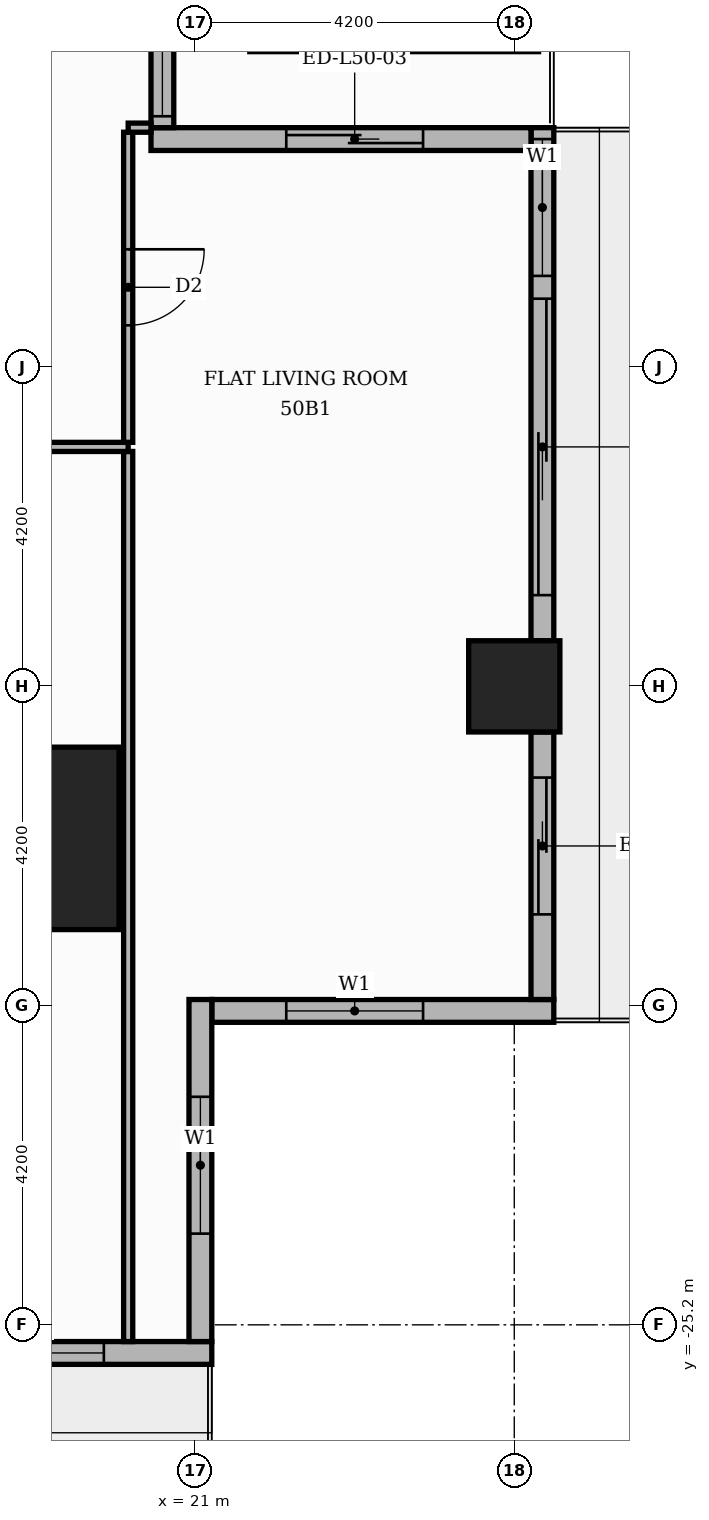
"""IFC4 building model, lengths in metres.
Left out: names, types, materials, properties, quantities, classifications, styles, units other than length and angle.
Written with IfcOpenShell. Run it as: python <this file> out.ifc"""

import sys

from ifc_helpers import new_model, si_unit, direction, frame, frame_2d, origin, origin_2d, place, context, subcontext, project, spatial, rectangle, extrude, element, fill, save


model = new_model("IFC4")
c1 = context("Model", 3, precision=1e-05, world=origin(), true_north=direction((0.0, 1.0)))
c2 = subcontext(c1, "Body", "Model", "MODEL_VIEW")
j1 = project(units=[si_unit("LENGTHUNIT", "METRE"), si_unit("PLANEANGLEUNIT", "RADIAN")], contexts=[c1])
p1 = place(None, origin())
s1 = spatial("IfcSite", under=j1, at=p1, CompositionType="ELEMENT")
p2 = place(p1, origin())
s2 = spatial("IfcBuilding", under=s1, at=p2, CompositionType="ELEMENT")
p3 = place(p2, frame((0.0, 0.0, 211.8)))
s3 = spatial("IfcBuildingStorey", under=s2, at=p3, CompositionType="ELEMENT", Elevation=211.8)
p4 = place(p3, frame((18.8, -18.8, 0.0), z_axis=(0.0, 0.0, 1.0), x_axis=(1.0, 0.0, 0.0)))
e1 = element("IfcColumn", 1, at=p4, inside=s3, PredefinedType="COLUMN", context=c2, shape_type="SweptSolid", body=[
    extrude(rectangle(XDim=2.4, YDim=2.4, at=origin_2d()), origin(), (0.0, 0.0, 1.0), 3.9),
])
p5 = place(p3, frame((25.2, -16.8, 0.0), z_axis=(0.0, 0.0, 1.0), x_axis=(1.0, 0.0, 0.0)))
e2 = element("IfcColumn", 2, at=p5, inside=s3, PredefinedType="COLUMN", context=c2, shape_type="SweptSolid", body=[
    extrude(rectangle(XDim=1.2, YDim=1.2, at=origin_2d()), origin(), (0.0, 0.0, 1.0), 3.9),
])
p6 = place(p3, frame((21.22, -21.07, 0.0), z_axis=(0.0, 0.0, 1.0), x_axis=(1.0, 0.0, 0.0)))
e3 = element("IfcWall", 3, at=p6, inside=s3, PredefinedType="STANDARD", context=c2, shape_type="SweptSolid", body=[
    extrude(rectangle(XDim=4.5, YDim=0.3, at=frame_2d((2.25, 0.0))), origin(), (0.0, 0.0, 1.0), 3.48),
])
p7 = place(p6, frame((0.98, 0.0, 0.9)))
e4 = element("IfcOpeningElement", 4, at=p7, cuts=e3, PredefinedType="OPENING", context=c2, shape_type="SweptSolid", body=[
    extrude(rectangle(XDim=1.8, YDim=2.1, at=frame_2d((0.9, 1.05))), frame((0.0, 0.16, 0.0), z_axis=(0.0, -1.0, 0.0), x_axis=(1.0, 0.0, 0.0)), (0.0, 0.0, 1.0), 0.32),
])
p8 = place(p3, frame((25.57, -20.92, 0.0), z_axis=(0.0, 0.0, 1.0), x_axis=(0.0, 1.0, 0.0)))
e5 = element("IfcWall", 5, at=p8, inside=s3, PredefinedType="STANDARD", context=c2, shape_type="SweptSolid", body=[
    extrude(rectangle(XDim=3.52, YDim=0.3, at=frame_2d((1.76, 0.0))), origin(), (0.0, 0.0, 1.0), 3.48),
])
p9 = place(p8, frame((1.12, 0.0, 0.0)))
e6 = element("IfcOpeningElement", 6, at=p9, cuts=e5, PredefinedType="OPENING", context=c2, shape_type="SweptSolid", body=[
    extrude(rectangle(XDim=1.8, YDim=2.4, at=frame_2d((0.9, 1.2))), frame((0.0, 0.16, 0.0), z_axis=(0.0, -1.0, 0.0), x_axis=(1.0, 0.0, 0.0)), (0.0, 0.0, 1.0), 0.32),
])
p10 = place(p3, frame((25.57, -16.2, 0.0), z_axis=(0.0, 0.0, 1.0), x_axis=(0.0, 1.0, 0.0)))
e7 = element("IfcWall", 7, at=p10, inside=s3, PredefinedType="STANDARD", context=c2, shape_type="SweptSolid", body=[
    extrude(rectangle(XDim=6.75, YDim=0.3, at=frame_2d((3.375, 0.0))), origin(), (0.0, 0.0, 1.0), 3.48),
])
p11 = place(p10, frame((0.6, 0.0, 0.0)))
e8 = element("IfcOpeningElement", 8, at=p11, cuts=e7, PredefinedType="OPENING", context=c2, shape_type="SweptSolid", body=[
    extrude(rectangle(XDim=3.9, YDim=2.4, at=frame_2d((1.95, 1.2))), frame((0.0, 0.16, 0.0), z_axis=(0.0, -1.0, 0.0), x_axis=(1.0, 0.0, 0.0)), (0.0, 0.0, 1.0), 0.32),
])
p12 = place(p10, frame((4.8, 0.0, 0.9)))
e9 = element("IfcOpeningElement", 9, at=p12, cuts=e7, PredefinedType="OPENING", context=c2, shape_type="SweptSolid", body=[
    extrude(rectangle(XDim=1.8, YDim=2.1, at=frame_2d((0.9, 1.05))), frame((0.0, 0.16, 0.0), z_axis=(0.0, -1.0, 0.0), x_axis=(1.0, 0.0, 0.0)), (0.0, 0.0, 1.0), 0.32),
])
p13 = place(p3, frame((25.42, -9.6, 0.0), z_axis=(0.0, 0.0, 1.0), x_axis=(-1.0, 0.0, 0.0)))
e10 = element("IfcWall", 10, at=p13, inside=s3, PredefinedType="STANDARD", context=c2, shape_type="SweptSolid", body=[
    extrude(rectangle(XDim=5.0, YDim=0.3, at=frame_2d((2.5, 0.0))), origin(), (0.0, 0.0, 1.0), 3.48),
])
p14 = place(p13, frame((1.42, 0.0, 0.0)))
e11 = element("IfcOpeningElement", 11, at=p14, cuts=e10, PredefinedType="OPENING", context=c2, shape_type="SweptSolid", body=[
    extrude(rectangle(XDim=1.8, YDim=2.4, at=frame_2d((0.9, 1.2))), frame((0.0, 0.16, 0.0), z_axis=(0.0, -1.0, 0.0), x_axis=(1.0, 0.0, 0.0)), (0.0, 0.0, 1.0), 0.32),
])
p15 = place(p3, frame((20.57, -9.45, 0.0), z_axis=(0.0, 0.0, 1.0), x_axis=(0.0, 1.0, 0.0)))
e12 = element("IfcWall", 12, at=p15, inside=s3, PredefinedType="STANDARD", context=c2, shape_type="SweptSolid", body=[
    extrude(rectangle(XDim=19.2, YDim=0.3, at=frame_2d((9.6, 0.0))), origin(), (0.0, 0.0, 1.0), 3.48),
])
p16 = place(p15, frame((0.15, 0.0, 0.9)))
e13 = element("IfcOpeningElement", 13, at=p16, cuts=e12, PredefinedType="OPENING", context=c2, shape_type="SweptSolid", body=[
    extrude(rectangle(XDim=6.0, YDim=2.1, at=frame_2d((3.0, 1.05))), frame((0.0, 0.16, 0.0), z_axis=(0.0, -1.0, 0.0), x_axis=(1.0, 0.0, 0.0)), (0.0, 0.0, 1.0), 0.32),
])
p17 = place(p15, frame((6.45, 0.0, 0.9)))
e14 = element("IfcOpeningElement", 14, at=p17, cuts=e12, PredefinedType="OPENING", context=c2, shape_type="SweptSolid", body=[
    extrude(rectangle(XDim=6.0, YDim=2.1, at=frame_2d((3.0, 1.05))), frame((0.0, 0.16, 0.0), z_axis=(0.0, -1.0, 0.0), x_axis=(1.0, 0.0, 0.0)), (0.0, 0.0, 1.0), 0.32),
])
p18 = place(p15, frame((12.75, 0.0, 0.9)))
e15 = element("IfcOpeningElement", 15, at=p18, cuts=e12, PredefinedType="OPENING", context=c2, shape_type="SweptSolid", body=[
    extrude(rectangle(XDim=6.0, YDim=2.1, at=frame_2d((3.0, 1.05))), frame((0.0, 0.16, 0.0), z_axis=(0.0, -1.0, 0.0), x_axis=(1.0, 0.0, 0.0)), (0.0, 0.0, 1.0), 0.32),
])
p19 = place(p3, frame((17.4, -25.57, 0.0), z_axis=(0.0, 0.0, 1.0), x_axis=(1.0, 0.0, 0.0)))
e16 = element("IfcWall", 16, at=p19, inside=s3, PredefinedType="STANDARD", context=c2, shape_type="SweptSolid", body=[
    extrude(rectangle(XDim=3.82, YDim=0.3, at=frame_2d((1.91, 0.0))), origin(), (0.0, 0.0, 1.0), 3.48),
])
p20 = place(p19, frame((0.6, 0.0, 0.9)))
e17 = element("IfcOpeningElement", 17, at=p20, cuts=e16, PredefinedType="OPENING", context=c2, shape_type="SweptSolid", body=[
    extrude(rectangle(XDim=1.8, YDim=2.1, at=frame_2d((0.9, 1.05))), frame((0.0, 0.16, 0.0), z_axis=(0.0, -1.0, 0.0), x_axis=(1.0, 0.0, 0.0)), (0.0, 0.0, 1.0), 0.32),
])
p21 = place(p3, frame((21.07, -25.42, 0.0), z_axis=(0.0, 0.0, 1.0), x_axis=(0.0, 1.0, 0.0)))
e18 = element("IfcWall", 18, at=p21, inside=s3, PredefinedType="STANDARD", context=c2, shape_type="SweptSolid", body=[
    extrude(rectangle(XDim=4.5, YDim=0.3, at=frame_2d((2.25, 0.0))), origin(), (0.0, 0.0, 1.0), 3.48),
])
p22 = place(p21, frame((1.42, 0.0, 0.9)))
e19 = element("IfcOpeningElement", 19, at=p22, cuts=e18, PredefinedType="OPENING", context=c2, shape_type="SweptSolid", body=[
    extrude(rectangle(XDim=1.8, YDim=2.1, at=frame_2d((0.9, 1.05))), frame((0.0, 0.16, 0.0), z_axis=(0.0, -1.0, 0.0), x_axis=(1.0, 0.0, 0.0)), (0.0, 0.0, 1.0), 0.32),
])
p23 = place(p3, frame((20.12, -25.42, 0.0), z_axis=(0.0, 0.0, 1.0), x_axis=(0.0, 1.0, 0.0)))
e20 = element("IfcWall", 20, at=p23, inside=s3, PredefinedType="PARTITIONING", context=c2, shape_type="SweptSolid", body=[
    extrude(rectangle(XDim=11.71, YDim=0.12, at=frame_2d((5.855, 0.0))), origin(), (0.0, 0.0, 1.0), 3.48),
])
p24 = place(p3, frame((13.65, -13.65, 0.0), z_axis=(0.0, 0.0, 1.0), x_axis=(1.0, 0.0, 0.0)))
e21 = element("IfcWall", 21, at=p24, inside=s3, PredefinedType="PARTITIONING", context=c2, shape_type="SweptSolid", body=[
    extrude(rectangle(XDim=6.47, YDim=0.12, at=frame_2d((3.235, 0.0))), origin(), (0.0, 0.0, 1.0), 3.48),
])
p25 = place(p24, frame((2.785, 0.0, 0.0)))
e22 = element("IfcOpeningElement", 22, at=p25, cuts=e21, PredefinedType="OPENING", context=c2, shape_type="SweptSolid", body=[
    extrude(rectangle(XDim=0.9, YDim=2.1, at=frame_2d((0.45, 1.05))), frame((0.0, 0.07, 0.0), z_axis=(0.0, -1.0, 0.0), x_axis=(1.0, 0.0, 0.0)), (0.0, 0.0, 1.0), 0.14),
])
p26 = place(p3, frame((20.12, -13.59, 0.0), z_axis=(0.0, 0.0, 1.0), x_axis=(0.0, 1.0, 0.0)))
e23 = element("IfcWall", 23, at=p26, inside=s3, PredefinedType="PARTITIONING", context=c2, shape_type="SweptSolid", body=[
    extrude(rectangle(XDim=4.08, YDim=0.12, at=frame_2d((2.04, 0.0))), origin(), (0.0, 0.0, 1.0), 3.48),
])
p27 = place(p26, frame((1.54, 0.0, 0.0)))
e24 = element("IfcOpeningElement", 24, at=p27, cuts=e23, PredefinedType="OPENING", context=c2, shape_type="SweptSolid", body=[
    extrude(rectangle(XDim=1.0, YDim=2.1, at=frame_2d((0.5, 1.05))), frame((0.0, 0.07, 0.0), z_axis=(0.0, -1.0, 0.0), x_axis=(1.0, 0.0, 0.0)), (0.0, 0.0, 1.0), 0.14),
])
p28 = place(p3, frame((20.12, -9.45, 0.0), z_axis=(0.0, 0.0, 1.0), x_axis=(1.0, 0.0, 0.0)))
e25 = element("IfcWall", 25, at=p28, inside=s3, PredefinedType="PARTITIONING", context=c2, shape_type="SweptSolid", body=[
    extrude(rectangle(XDim=0.3, YDim=0.12, at=frame_2d((0.15, 0.0))), origin(), (0.0, 0.0, 1.0), 3.48),
])
p29 = place(p7, origin())
e26 = element("IfcWindow", 26, at=p29, inside=s3, PartitioningType="SINGLE_PANEL", PredefinedType="WINDOW", context=c2, shape_type="SweptSolid", body=[
    extrude(rectangle(XDim=1.8, YDim=2.1, at=frame_2d((0.9, 1.05))), frame((0.0, 0.03, 0.0), z_axis=(0.0, -1.0, 0.0), x_axis=(1.0, 0.0, 0.0)), (0.0, 0.0, 1.0), 0.06),
])
fill(e4, e26)
p30 = place(p9, origin())
e27 = element("IfcDoor", 27, at=p30, inside=s3, OperationType="SLIDING_TO_RIGHT", PredefinedType="DOOR", context=c2, shape_type="SweptSolid", body=[
    extrude(rectangle(XDim=1.8, YDim=2.4, at=frame_2d((0.9, 1.2))), frame((0.0, 0.025, 0.0), z_axis=(0.0, -1.0, 0.0), x_axis=(1.0, 0.0, 0.0)), (0.0, 0.0, 1.0), 0.05),
])
fill(e6, e27)
p31 = place(p11, origin())
e28 = element("IfcDoor", 28, at=p31, inside=s3, OperationType="SLIDING_TO_LEFT", PredefinedType="DOOR", context=c2, shape_type="SweptSolid", body=[
    extrude(rectangle(XDim=3.9, YDim=2.4, at=frame_2d((1.95, 1.2))), frame((0.0, 0.025, 0.0), z_axis=(0.0, -1.0, 0.0), x_axis=(1.0, 0.0, 0.0)), (0.0, 0.0, 1.0), 0.05),
])
fill(e8, e28)
p32 = place(p12, origin())
e29 = element("IfcWindow", 29, at=p32, inside=s3, PartitioningType="SINGLE_PANEL", PredefinedType="WINDOW", context=c2, shape_type="SweptSolid", body=[
    extrude(rectangle(XDim=1.8, YDim=2.1, at=frame_2d((0.9, 1.05))), frame((0.0, 0.03, 0.0), z_axis=(0.0, -1.0, 0.0), x_axis=(1.0, 0.0, 0.0)), (0.0, 0.0, 1.0), 0.06),
])
fill(e9, e29)
p33 = place(p14, origin())
e30 = element("IfcDoor", 30, at=p33, inside=s3, OperationType="SLIDING_TO_LEFT", PredefinedType="DOOR", context=c2, shape_type="SweptSolid", body=[
    extrude(rectangle(XDim=1.8, YDim=2.4, at=frame_2d((0.9, 1.2))), frame((0.0, 0.025, 0.0), z_axis=(0.0, -1.0, 0.0), x_axis=(1.0, 0.0, 0.0)), (0.0, 0.0, 1.0), 0.05),
])
fill(e11, e30)
p34 = place(p16, origin())
e31 = element("IfcWindow", 31, at=p34, inside=s3, PartitioningType="SINGLE_PANEL", PredefinedType="WINDOW", context=c2, shape_type="SweptSolid", body=[
    extrude(rectangle(XDim=6.0, YDim=2.1, at=frame_2d((3.0, 1.05))), frame((0.0, 0.03, 0.0), z_axis=(0.0, -1.0, 0.0), x_axis=(1.0, 0.0, 0.0)), (0.0, 0.0, 1.0), 0.06),
])
fill(e13, e31)
p35 = place(p20, origin())
e32 = element("IfcWindow", 32, at=p35, inside=s3, PartitioningType="SINGLE_PANEL", PredefinedType="WINDOW", context=c2, shape_type="SweptSolid", body=[
    extrude(rectangle(XDim=1.8, YDim=2.1, at=frame_2d((0.9, 1.05))), frame((0.0, 0.03, 0.0), z_axis=(0.0, -1.0, 0.0), x_axis=(1.0, 0.0, 0.0)), (0.0, 0.0, 1.0), 0.06),
])
fill(e17, e32)
p36 = place(p22, origin())
e33 = element("IfcWindow", 33, at=p36, inside=s3, PartitioningType="SINGLE_PANEL", PredefinedType="WINDOW", context=c2, shape_type="SweptSolid", body=[
    extrude(rectangle(XDim=1.8, YDim=2.1, at=frame_2d((0.9, 1.05))), frame((0.0, 0.03, 0.0), z_axis=(0.0, -1.0, 0.0), x_axis=(1.0, 0.0, 0.0)), (0.0, 0.0, 1.0), 0.06),
])
fill(e19, e33)
p37 = place(p27, frame((1.0, 0.0, 0.0), z_axis=(0.0, 0.0, 1.0), x_axis=(-1.0, 0.0, 0.0)))
e34 = element("IfcDoor", 34, at=p37, inside=s3, OperationType="SINGLE_SWING_RIGHT", PredefinedType="DOOR", context=c2, shape_type="SweptSolid", body=[
    extrude(rectangle(XDim=1.0, YDim=2.1, at=frame_2d((0.5, 1.05))), frame((0.0, 0.025, 0.0), z_axis=(0.0, -1.0, 0.0), x_axis=(1.0, 0.0, 0.0)), (0.0, 0.0, 1.0), 0.05),
])
fill(e24, e34)
save(model, sys.argv[1])
